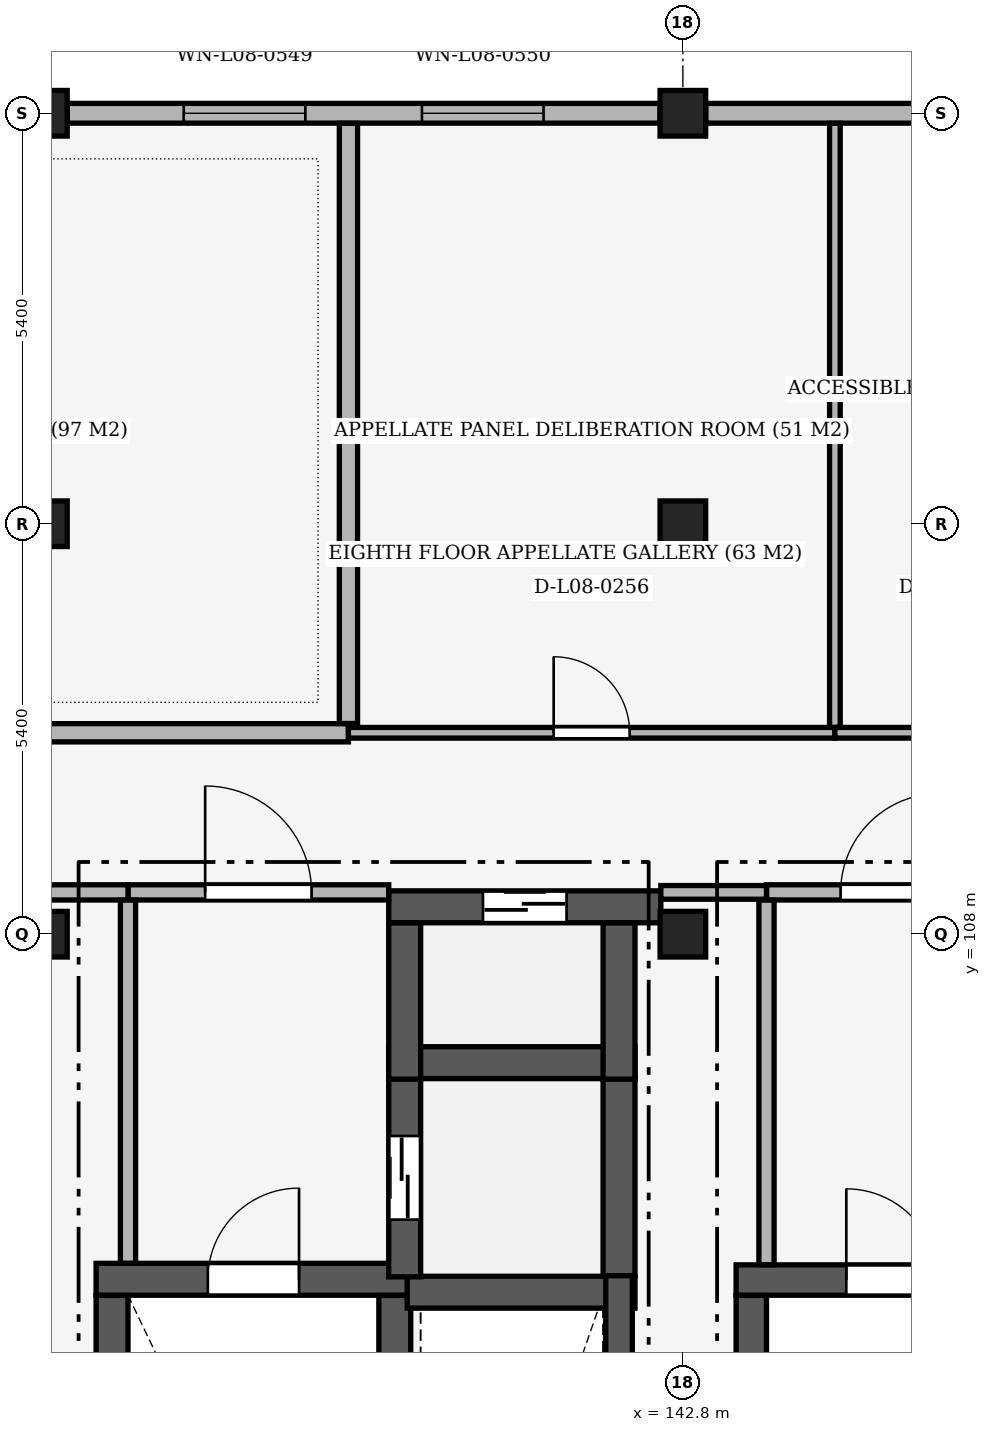
"""IFC4 building model, lengths in metres.
Left out: names, types, materials, properties, quantities, classifications, styles, units other than length and angle.
Written with IfcOpenShell. Run it as: python <this file> out.ifc"""

import sys

from ifc_helpers import new_model, si_unit, direction, frame, frame_2d, origin, origin_2d, place, context, subcontext, project, spatial, rectangle, extrude, element, fill, save


model = new_model("IFC4")
c1 = context("Model", 3, precision=1e-05, world=origin(), true_north=direction((0.0, 1.0)))
c2 = subcontext(c1, "Body", "Model", "MODEL_VIEW")
j1 = project(units=[si_unit("LENGTHUNIT", "METRE"), si_unit("PLANEANGLEUNIT", "RADIAN")], contexts=[c1])
p1 = place(None, origin())
s1 = spatial("IfcSite", under=j1, at=p1, CompositionType="ELEMENT")
p2 = place(p1, origin())
s2 = spatial("IfcBuilding", under=s1, at=p2, CompositionType="ELEMENT")
p3 = place(p2, frame((0.0, 0.0, 37.8)))
s3 = spatial("IfcBuildingStorey", under=s2, at=p3, CompositionType="ELEMENT", Elevation=37.8)
for number, where, z_axis, x_axis in (
    (1, (134.4, 108.0, 0.0), (0.0, 0.0, 1.0), (1.0, 0.0, 0.0)),
    (2, (134.4, 113.4, 0.0), (0.0, 0.0, 1.0), (1.0, 0.0, 0.0)),
    (3, (134.4, 118.8, 0.0), (0.0, 0.0, 1.0), (1.0, 0.0, 0.0)),
    (4, (142.8, 108.0, 0.0), (0.0, 0.0, 1.0), (1.0, 0.0, 0.0)),
    (5, (142.8, 113.4, 0.0), (0.0, 0.0, 1.0), (1.0, 0.0, 0.0)),
    (6, (142.8, 118.8, 0.0), (0.0, 0.0, 1.0), (1.0, 0.0, 0.0)),
):
    element("IfcColumn", number, at=place(p3, frame(where, z_axis=z_axis, x_axis=x_axis)), inside=s3, PredefinedType="COLUMN", context=c2, shape_type="SweptSolid", body=[
        extrude(rectangle(XDim=0.6, YDim=0.6, at=origin_2d()), origin(), (0.0, 0.0, 1.0), 4.2),
    ])
p4 = place(p3, frame((134.7, 118.8, 0.0), z_axis=(0.0, 0.0, 1.0), x_axis=(1.0, 0.0, 0.0)))
e7 = element("IfcWall", 7, at=p4, inside=s3, PredefinedType="SOLIDWALL", context=c2, shape_type="SweptSolid", body=[
    extrude(rectangle(XDim=7.8, YDim=0.26, at=frame_2d((3.9, 0.0))), origin(), (0.0, 0.0, 1.0), 3.26),
])
p5 = place(p4, frame((1.533, 0.0, 1.05)))
e8 = element("IfcOpeningElement", 8, at=p5, cuts=e7, PredefinedType="OPENING", context=c2, shape_type="SweptSolid", body=[
    extrude(rectangle(XDim=1.6, YDim=1.8, at=frame_2d((0.8, 0.9))), frame((0.0, 0.145, 0.0), z_axis=(0.0, -1.0, 0.0), x_axis=(1.0, 0.0, 0.0)), (0.0, 0.0, 1.0), 0.29),
])
p6 = place(p4, frame((4.667, 0.0, 1.05)))
e9 = element("IfcOpeningElement", 9, at=p6, cuts=e7, PredefinedType="OPENING", context=c2, shape_type="SweptSolid", body=[
    extrude(rectangle(XDim=1.6, YDim=1.8, at=frame_2d((0.8, 0.9))), frame((0.0, 0.145, 0.0), z_axis=(0.0, -1.0, 0.0), x_axis=(1.0, 0.0, 0.0)), (0.0, 0.0, 1.0), 0.29),
])
p7 = place(p3, frame((143.1, 118.8, 0.0), z_axis=(0.0, 0.0, 1.0), x_axis=(1.0, 0.0, 0.0)))
e10 = element("IfcWall", 10, at=p7, inside=s3, PredefinedType="SOLIDWALL", context=c2, shape_type="SweptSolid", body=[
    extrude(rectangle(XDim=7.8, YDim=0.26, at=frame_2d((3.9, 0.0))), origin(), (0.0, 0.0, 1.0), 3.26),
])
p8 = place(p3, frame((135.08, 103.46, 0.0), z_axis=(0.0, 0.0, 1.0), x_axis=(1.0, 0.0, 0.0)))
e11 = element("IfcWall", 11, at=p8, inside=s3, PredefinedType="SHEAR", context=c2, shape_type="SweptSolid", body=[
    extrude(rectangle(XDim=4.14, YDim=0.42, at=frame_2d((2.07, 0.0))), origin(), (0.0, 0.0, 1.0), 3.96),
])
p9 = place(p8, frame((1.47, 0.0, 0.0)))
e12 = element("IfcOpeningElement", 12, at=p9, cuts=e11, PredefinedType="OPENING", context=c2, shape_type="SweptSolid", body=[
    extrude(rectangle(XDim=1.2, YDim=2.2, at=frame_2d((0.6, 1.1))), frame((0.0, 0.225, 0.0), z_axis=(0.0, -1.0, 0.0), x_axis=(1.0, 0.0, 0.0)), (0.0, 0.0, 1.0), 0.45),
])
for number, where, z_axis, x_axis in (
    (13, (135.29, 96.352, 0.0), (0.0, 0.0, 1.0), (0.0, 1.0, 0.0)),
    (14, (139.01, 96.352, 0.0), (0.0, 0.0, 1.0), (0.0, 1.0, 0.0)),
):
    element("IfcWall", number, at=place(p3, frame(where, z_axis=z_axis, x_axis=x_axis)), inside=s3, PredefinedType="SHEAR", context=c2, shape_type="SweptSolid", body=[
        extrude(rectangle(XDim=6.896, YDim=0.42, at=frame_2d((3.448, 0.0))), origin(), (0.0, 0.0, 1.0), 3.96),
    ])
p10 = place(p3, frame((139.173, 103.29, 0.0), z_axis=(0.0, 0.0, 1.0), x_axis=(1.0, 0.0, 0.0)))
e15 = element("IfcWall", 15, at=p10, inside=s3, PredefinedType="SHEAR", context=c2, shape_type="SweptSolid", body=[
    extrude(rectangle(XDim=2.997, YDim=0.42, at=frame_2d((1.499, 0.0))), origin(), (0.0, 0.0, 1.0), 3.96),
])
p11 = place(p3, frame((138.93, 106.31, 0.0), z_axis=(0.0, 0.0, 1.0), x_axis=(1.0, 0.0, 0.0)))
e16 = element("IfcWall", 16, at=p11, inside=s3, PredefinedType="SHEAR", context=c2, shape_type="SweptSolid", body=[
    extrude(rectangle(XDim=3.24, YDim=0.42, at=frame_2d((1.62, 0.0))), origin(), (0.0, 0.0, 1.0), 3.96),
])
p12 = place(p3, frame((139.14, 103.492, 0.0), z_axis=(0.0, 0.0, 1.0), x_axis=(0.0, 1.0, 0.0)))
e17 = element("IfcWall", 17, at=p12, inside=s3, PredefinedType="SHEAR", context=c2, shape_type="SweptSolid", body=[
    extrude(rectangle(XDim=2.606, YDim=0.42, at=frame_2d((1.303, 0.0))), origin(), (0.0, 0.0, 1.0), 3.96),
])
p13 = place(p12, frame((0.753, 0.0, 0.0)))
e18 = element("IfcOpeningElement", 18, at=p13, cuts=e17, PredefinedType="OPENING", context=c2, shape_type="SweptSolid", body=[
    extrude(rectangle(XDim=1.1, YDim=2.15, at=frame_2d((0.55, 1.075))), frame((0.0, 0.225, 0.0), z_axis=(0.0, -1.0, 0.0), x_axis=(1.0, 0.0, 0.0)), (0.0, 0.0, 1.0), 0.45),
])
p14 = place(p3, frame((141.96, 103.502, 0.0), z_axis=(0.0, 0.0, 1.0), x_axis=(0.0, 1.0, 0.0)))
e19 = element("IfcWall", 19, at=p14, inside=s3, PredefinedType="SHEAR", context=c2, shape_type="SweptSolid", body=[
    extrude(rectangle(XDim=2.596, YDim=0.42, at=frame_2d((1.298, 0.0))), origin(), (0.0, 0.0, 1.0), 3.96),
])
p15 = place(p3, frame((138.93, 108.36, 0.0), z_axis=(0.0, 0.0, 1.0), x_axis=(1.0, 0.0, 0.0)))
e20 = element("IfcWall", 20, at=p15, inside=s3, PredefinedType="SHEAR", context=c2, shape_type="SweptSolid", body=[
    extrude(rectangle(XDim=3.58, YDim=0.42, at=frame_2d((1.79, 0.0))), origin(), (0.0, 0.0, 1.0), 3.96),
])
p16 = place(p15, frame((1.24, 0.0, 0.0)))
e21 = element("IfcOpeningElement", 21, at=p16, cuts=e20, PredefinedType="OPENING", context=c2, shape_type="SweptSolid", body=[
    extrude(rectangle(XDim=1.1, YDim=2.15, at=frame_2d((0.55, 1.075))), frame((0.0, 0.225, 0.0), z_axis=(0.0, -1.0, 0.0), x_axis=(1.0, 0.0, 0.0)), (0.0, 0.0, 1.0), 0.45),
])
for number, where, z_axis, x_axis in (
    (22, (139.14, 106.093, 0.0), (0.0, 0.0, 1.0), (0.0, 1.0, 0.0)),
    (23, (141.96, 106.093, 0.0), (0.0, 0.0, 1.0), (0.0, 1.0, 0.0)),
):
    element("IfcWall", number, at=place(p3, frame(where, z_axis=z_axis, x_axis=x_axis)), inside=s3, PredefinedType="SHEAR", context=c2, shape_type="SweptSolid", body=[
        extrude(rectangle(XDim=2.055, YDim=0.42, at=frame_2d((1.027, 0.0))), origin(), (0.0, 0.0, 1.0), 3.96),
    ])
p17 = place(p3, frame((141.96, 96.31, 0.0), z_axis=(0.0, 0.0, 1.0), x_axis=(0.0, 1.0, 0.0)))
e24 = element("IfcWall", 24, at=p17, inside=s3, PredefinedType="SHEAR", context=c2, shape_type="SweptSolid", body=[
    extrude(rectangle(XDim=7.197, YDim=0.35, at=frame_2d((3.599, 0.0))), origin(), (0.0, 0.0, 1.0), 3.96),
])
p18 = place(p3, frame((143.5, 103.45, 0.0), z_axis=(0.0, 0.0, 1.0), x_axis=(1.0, 0.0, 0.0)))
e25 = element("IfcWall", 25, at=p18, inside=s3, PredefinedType="SHEAR", context=c2, shape_type="SweptSolid", body=[
    extrude(rectangle(XDim=4.1, YDim=0.4, at=frame_2d((2.05, 0.0))), origin(), (0.0, 0.0, 1.0), 3.96),
])
p19 = place(p18, frame((1.45, 0.0, 0.0)))
e26 = element("IfcOpeningElement", 26, at=p19, cuts=e25, PredefinedType="OPENING", context=c2, shape_type="SweptSolid", body=[
    extrude(rectangle(XDim=1.2, YDim=2.2, at=frame_2d((0.6, 1.1))), frame((0.0, 0.215, 0.0), z_axis=(0.0, -1.0, 0.0), x_axis=(1.0, 0.0, 0.0)), (0.0, 0.0, 1.0), 0.43),
])
p20 = place(p3, frame((143.7, 96.352, 0.0), z_axis=(0.0, 0.0, 1.0), x_axis=(0.0, 1.0, 0.0)))
e27 = element("IfcWall", 27, at=p20, inside=s3, PredefinedType="SHEAR", context=c2, shape_type="SweptSolid", body=[
    extrude(rectangle(XDim=6.896, YDim=0.4, at=frame_2d((3.448, 0.0))), origin(), (0.0, 0.0, 1.0), 3.96),
])
p21 = place(p3, frame((135.5, 108.55, 0.0), z_axis=(0.0, 0.0, 1.0), x_axis=(1.0, 0.0, 0.0)))
e28 = element("IfcWall", 28, at=p21, inside=s3, PredefinedType="PARTITIONING", context=c2, shape_type="SweptSolid", body=[
    extrude(rectangle(XDim=3.43, YDim=0.2, at=frame_2d((1.715, 0.0))), origin(), (0.0, 0.0, 1.0), 3.96),
])
p22 = place(p21, frame((1.015, 0.0, 0.0)))
e29 = element("IfcOpeningElement", 29, at=p22, cuts=e28, PredefinedType="OPENING", context=c2, shape_type="SweptSolid", body=[
    extrude(rectangle(XDim=1.4, YDim=2.2, at=frame_2d((0.7, 1.1))), frame((0.0, 0.115, 0.0), z_axis=(0.0, -1.0, 0.0), x_axis=(1.0, 0.0, 0.0)), (0.0, 0.0, 1.0), 0.23),
])
p23 = place(p3, frame((143.9, 108.55, 0.0), z_axis=(0.0, 0.0, 1.0), x_axis=(1.0, 0.0, 0.0)))
e30 = element("IfcWall", 30, at=p23, inside=s3, PredefinedType="PARTITIONING", context=c2, shape_type="SweptSolid", body=[
    extrude(rectangle(XDim=3.25, YDim=0.2, at=frame_2d((1.625, 0.0))), origin(), (0.0, 0.0, 1.0), 3.96),
])
p24 = place(p23, frame((0.975, 0.0, 0.0)))
e31 = element("IfcOpeningElement", 31, at=p24, cuts=e30, PredefinedType="OPENING", context=c2, shape_type="SweptSolid", body=[
    extrude(rectangle(XDim=1.3, YDim=2.2, at=frame_2d((0.65, 1.1))), frame((0.0, 0.115, 0.0), z_axis=(0.0, -1.0, 0.0), x_axis=(1.0, 0.0, 0.0)), (0.0, 0.0, 1.0), 0.23),
])
p25 = place(p3, frame((134.38, 108.55, 0.0), z_axis=(0.0, 0.0, 1.0), x_axis=(1.0, 0.0, 0.0)))
e32 = element("IfcWall", 32, at=p25, inside=s3, PredefinedType="PARTITIONING", context=c2, shape_type="SweptSolid", body=[
    extrude(rectangle(XDim=1.12, YDim=0.2, at=frame_2d((0.56, 0.0))), origin(), (0.0, 0.0, 1.0), 3.41),
])
p26 = place(p3, frame((142.51, 108.55, 0.0), z_axis=(0.0, 0.0, 1.0), x_axis=(1.0, 0.0, 0.0)))
e33 = element("IfcWall", 33, at=p26, inside=s3, PredefinedType="PARTITIONING", context=c2, shape_type="SweptSolid", body=[
    extrude(rectangle(XDim=1.39, YDim=0.18, at=frame_2d((0.695, 0.0))), origin(), (0.0, 0.0, 1.0), 3.41),
])
p27 = place(p3, frame((126.132, 110.65, 0.0), z_axis=(0.0, 0.0, 1.0), x_axis=(1.0, 0.0, 0.0)))
e34 = element("IfcWall", 34, at=p27, inside=s3, PredefinedType="PARTITIONING", context=c2, shape_type="SweptSolid", body=[
    extrude(rectangle(XDim=12.268, YDim=0.24, at=frame_2d((6.134, 0.0))), origin(), (0.0, 0.0, 1.0), 3.41),
])
p28 = place(p27, frame((5.234, 0.0, 0.0)))
e35 = element("IfcOpeningElement", 35, at=p28, cuts=e34, PredefinedType="OPENING", context=c2, shape_type="SweptSolid", body=[
    extrude(rectangle(XDim=1.8, YDim=2.4, at=frame_2d((0.9, 1.2))), frame((0.0, 0.135, 0.0), z_axis=(0.0, -1.0, 0.0), x_axis=(1.0, 0.0, 0.0)), (0.0, 0.0, 1.0), 0.27),
])
p29 = place(p3, frame((138.4, 110.65, 0.0), z_axis=(0.0, 0.0, 1.0), x_axis=(1.0, 0.0, 0.0)))
e36 = element("IfcWall", 36, at=p29, inside=s3, PredefinedType="PARTITIONING", context=c2, shape_type="SweptSolid", body=[
    extrude(rectangle(XDim=6.4, YDim=0.14, at=frame_2d((3.2, 0.0))), origin(), (0.0, 0.0, 1.0), 3.41),
])
p30 = place(p29, frame((2.7, 0.0, 0.0)))
e37 = element("IfcOpeningElement", 37, at=p30, cuts=e36, PredefinedType="OPENING", context=c2, shape_type="SweptSolid", body=[
    extrude(rectangle(XDim=1.0, YDim=2.2, at=frame_2d((0.5, 1.1))), frame((0.0, 0.085, 0.0), z_axis=(0.0, -1.0, 0.0), x_axis=(1.0, 0.0, 0.0)), (0.0, 0.0, 1.0), 0.17),
])
p31 = place(p3, frame((144.8, 110.65, 0.0), z_axis=(0.0, 0.0, 1.0), x_axis=(1.0, 0.0, 0.0)))
e38 = element("IfcWall", 38, at=p31, inside=s3, PredefinedType="PARTITIONING", context=c2, shape_type="SweptSolid", body=[
    extrude(rectangle(XDim=3.2, YDim=0.14, at=frame_2d((1.6, 0.0))), origin(), (0.0, 0.0, 1.0), 3.96),
])
p32 = place(p31, frame((1.15, 0.0, 0.0)))
e39 = element("IfcOpeningElement", 39, at=p32, cuts=e38, PredefinedType="OPENING", context=c2, shape_type="SweptSolid", body=[
    extrude(rectangle(XDim=0.9, YDim=2.1, at=frame_2d((0.45, 1.05))), frame((0.0, 0.085, 0.0), z_axis=(0.0, -1.0, 0.0), x_axis=(1.0, 0.0, 0.0)), (0.0, 0.0, 1.0), 0.17),
])
p33 = place(p3, frame((135.5, 103.672, 0.0), z_axis=(0.0, 0.0, 1.0), x_axis=(0.0, 1.0, 0.0)))
e40 = element("IfcWall", 40, at=p33, inside=s3, PredefinedType="PARTITIONING", context=c2, shape_type="SweptSolid", body=[
    extrude(rectangle(XDim=4.776, YDim=0.2, at=frame_2d((2.388, 0.0))), origin(), (0.0, 0.0, 1.0), 3.96),
])
p34 = place(p3, frame((138.4, 110.772, 0.0), z_axis=(0.0, 0.0, 1.0), x_axis=(0.0, 1.0, 0.0)))
e41 = element("IfcWall", 41, at=p34, inside=s3, PredefinedType="PARTITIONING", context=c2, shape_type="SweptSolid", body=[
    extrude(rectangle(XDim=7.896, YDim=0.24, at=frame_2d((3.948, 0.0))), origin(), (0.0, 0.0, 1.0), 3.26),
])
p35 = place(p3, frame((143.9, 103.652, 0.0), z_axis=(0.0, 0.0, 1.0), x_axis=(0.0, 1.0, 0.0)))
e42 = element("IfcWall", 42, at=p35, inside=s3, PredefinedType="PARTITIONING", context=c2, shape_type="SweptSolid", body=[
    extrude(rectangle(XDim=4.796, YDim=0.2, at=frame_2d((2.398, 0.0))), origin(), (0.0, 0.0, 1.0), 3.96),
])
p36 = place(p3, frame((144.8, 110.722, 0.0), z_axis=(0.0, 0.0, 1.0), x_axis=(0.0, 1.0, 0.0)))
e43 = element("IfcWall", 43, at=p36, inside=s3, PredefinedType="PARTITIONING", context=c2, shape_type="SweptSolid", body=[
    extrude(rectangle(XDim=7.946, YDim=0.14, at=frame_2d((3.973, 0.0))), origin(), (0.0, 0.0, 1.0), 3.26),
])
p37 = place(p5, origin())
e44 = element("IfcWindow", 44, at=p37, inside=s3, PartitioningType="SINGLE_PANEL", PredefinedType="WINDOW", context=c2, shape_type="SweptSolid", body=[
    extrude(rectangle(XDim=1.6, YDim=1.8, at=frame_2d((0.8, 0.9))), frame((0.0, 0.03, 0.0), z_axis=(0.0, -1.0, 0.0), x_axis=(1.0, 0.0, 0.0)), (0.0, 0.0, 1.0), 0.06),
])
fill(e8, e44)
p38 = place(p6, origin())
e45 = element("IfcWindow", 45, at=p38, inside=s3, PartitioningType="SINGLE_PANEL", PredefinedType="WINDOW", context=c2, shape_type="SweptSolid", body=[
    extrude(rectangle(XDim=1.6, YDim=1.8, at=frame_2d((0.8, 0.9))), frame((0.0, 0.03, 0.0), z_axis=(0.0, -1.0, 0.0), x_axis=(1.0, 0.0, 0.0)), (0.0, 0.0, 1.0), 0.06),
])
fill(e9, e45)
p39 = place(p9, origin())
e46 = element("IfcDoor", 46, at=p39, inside=s3, OperationType="SINGLE_SWING_RIGHT", PredefinedType="DOOR", context=c2, shape_type="SweptSolid", body=[
    extrude(rectangle(XDim=1.2, YDim=2.2, at=frame_2d((0.6, 1.1))), frame((0.0, 0.025, 0.0), z_axis=(0.0, -1.0, 0.0), x_axis=(1.0, 0.0, 0.0)), (0.0, 0.0, 1.0), 0.05),
])
fill(e12, e46)
p40 = place(p13, origin())
e47 = element("IfcDoor", 47, at=p40, inside=s3, OperationType="DOUBLE_DOOR_SLIDING", PredefinedType="DOOR", context=c2, shape_type="SweptSolid", body=[
    extrude(rectangle(XDim=1.1, YDim=2.15, at=frame_2d((0.55, 1.075))), frame((0.0, 0.025, 0.0), z_axis=(0.0, -1.0, 0.0), x_axis=(1.0, 0.0, 0.0)), (0.0, 0.0, 1.0), 0.05),
])
fill(e18, e47)
p41 = place(p16, origin())
e48 = element("IfcDoor", 48, at=p41, inside=s3, OperationType="DOUBLE_DOOR_SLIDING", PredefinedType="DOOR", context=c2, shape_type="SweptSolid", body=[
    extrude(rectangle(XDim=1.1, YDim=2.15, at=frame_2d((0.55, 1.075))), frame((0.0, 0.025, 0.0), z_axis=(0.0, -1.0, 0.0), x_axis=(1.0, 0.0, 0.0)), (0.0, 0.0, 1.0), 0.05),
])
fill(e21, e48)
p42 = place(p19, origin())
e49 = element("IfcDoor", 49, at=p42, inside=s3, OperationType="SINGLE_SWING_LEFT", PredefinedType="DOOR", context=c2, shape_type="SweptSolid", body=[
    extrude(rectangle(XDim=1.2, YDim=2.2, at=frame_2d((0.6, 1.1))), frame((0.0, 0.025, 0.0), z_axis=(0.0, -1.0, 0.0), x_axis=(1.0, 0.0, 0.0)), (0.0, 0.0, 1.0), 0.05),
])
fill(e26, e49)
p43 = place(p22, origin())
e50 = element("IfcDoor", 50, at=p43, inside=s3, OperationType="SINGLE_SWING_LEFT", PredefinedType="DOOR", context=c2, shape_type="SweptSolid", body=[
    extrude(rectangle(XDim=1.4, YDim=2.2, at=frame_2d((0.7, 1.1))), frame((0.0, 0.025, 0.0), z_axis=(0.0, -1.0, 0.0), x_axis=(1.0, 0.0, 0.0)), (0.0, 0.0, 1.0), 0.05),
])
fill(e29, e50)
p44 = place(p24, origin())
e51 = element("IfcDoor", 51, at=p44, inside=s3, OperationType="SINGLE_SWING_RIGHT", PredefinedType="DOOR", context=c2, shape_type="SweptSolid", body=[
    extrude(rectangle(XDim=1.3, YDim=2.2, at=frame_2d((0.65, 1.1))), frame((0.0, 0.025, 0.0), z_axis=(0.0, -1.0, 0.0), x_axis=(1.0, 0.0, 0.0)), (0.0, 0.0, 1.0), 0.05),
])
fill(e31, e51)
p45 = place(p30, origin())
e52 = element("IfcDoor", 52, at=p45, inside=s3, OperationType="SINGLE_SWING_LEFT", PredefinedType="DOOR", context=c2, shape_type="SweptSolid", body=[
    extrude(rectangle(XDim=1.0, YDim=2.2, at=frame_2d((0.5, 1.1))), frame((0.0, 0.025, 0.0), z_axis=(0.0, -1.0, 0.0), x_axis=(1.0, 0.0, 0.0)), (0.0, 0.0, 1.0), 0.05),
])
fill(e37, e52)
save(model, sys.argv[1])
